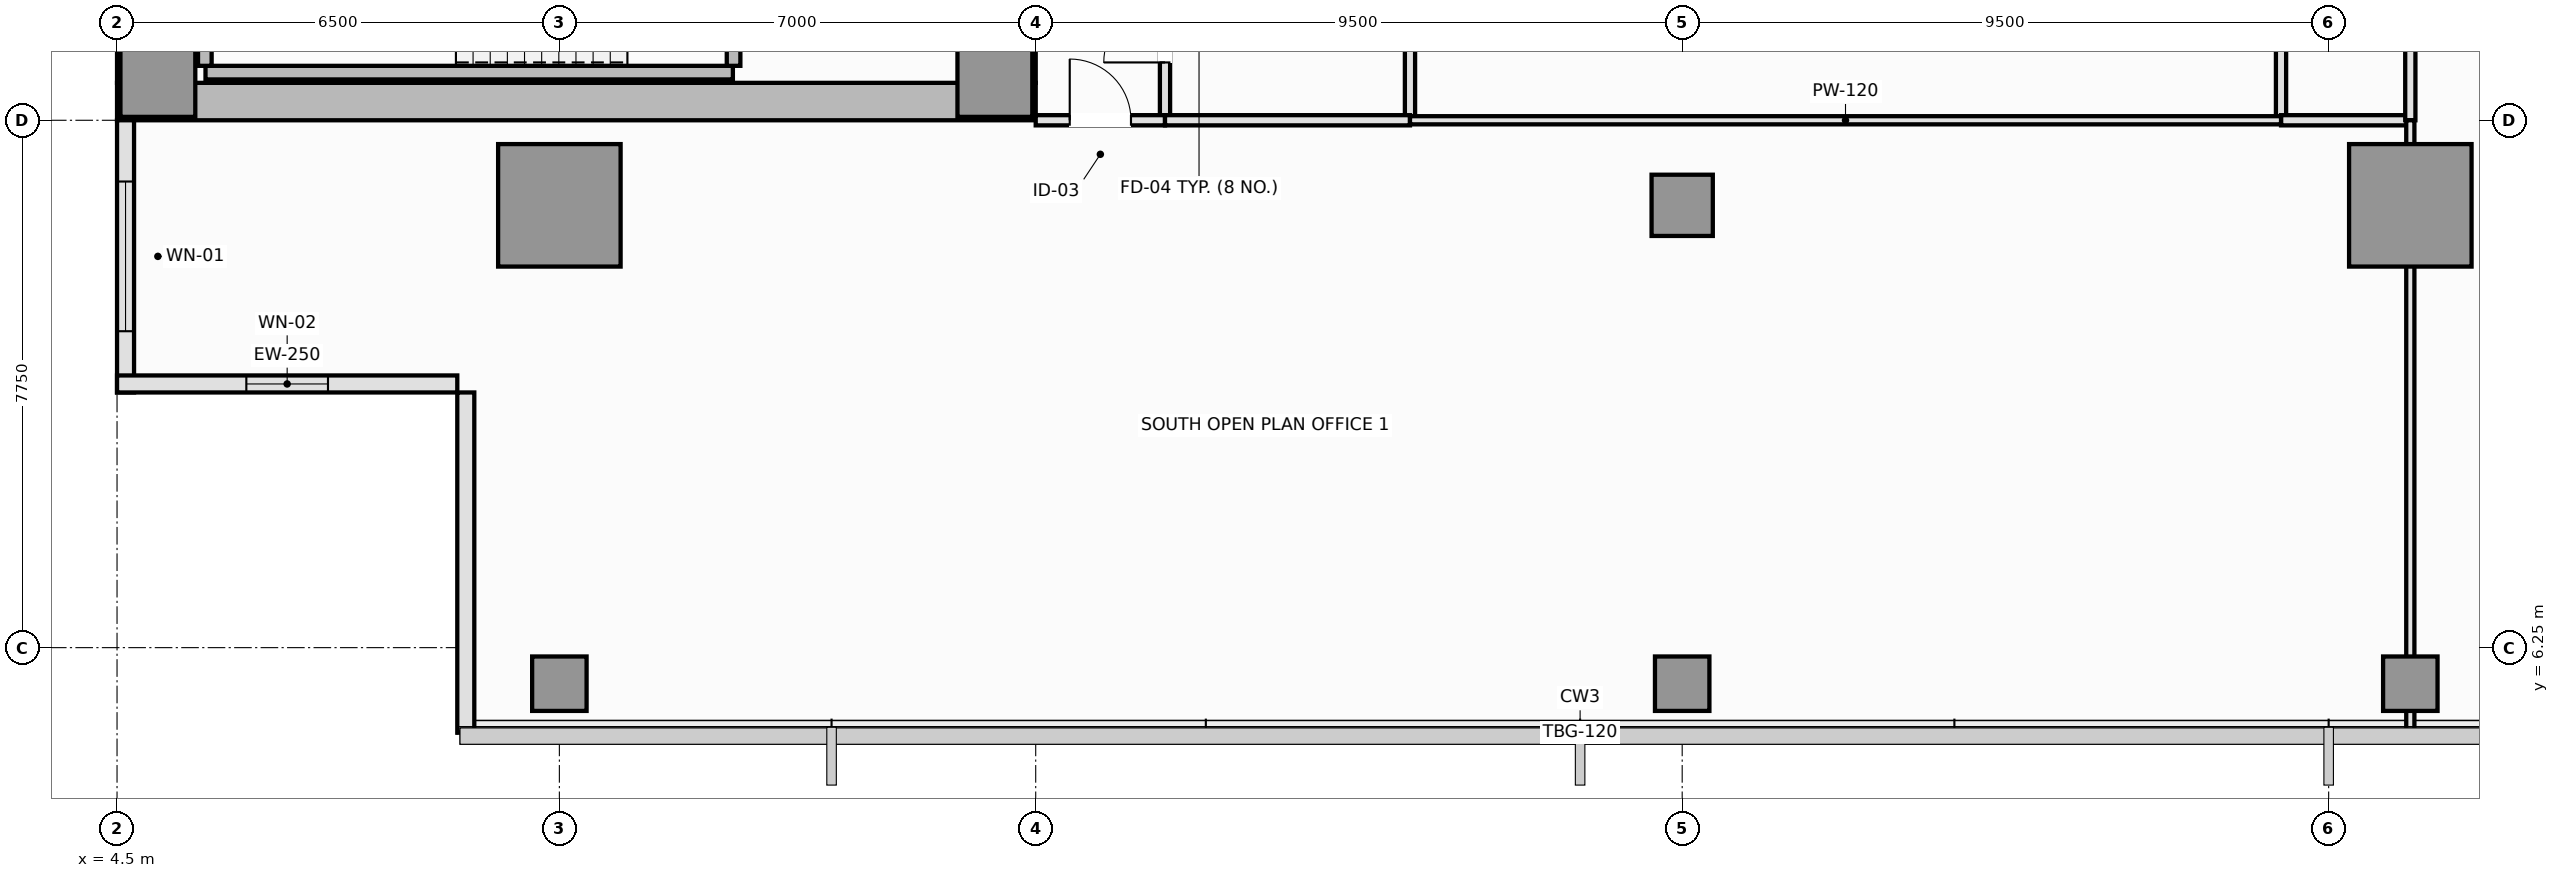
"""IFC4 building model, lengths in metres.
Left out: names, types, materials, properties, quantities, classifications, styles, units other than length and angle.
Written with IfcOpenShell. Run it as: python <this file> out.ifc"""

import sys

from ifc_helpers import new_model, si_unit, direction, frame, frame_2d, origin, origin_2d, place, context, subcontext, project, spatial, rectangle, extrude, element, fill, save


model = new_model("IFC4")
c1 = context("Model", 3, precision=1e-05, world=origin(), true_north=direction((0.0, 1.0)))
c2 = subcontext(c1, "Body", "Model", "MODEL_VIEW")
j1 = project(units=[si_unit("LENGTHUNIT", "METRE"), si_unit("PLANEANGLEUNIT", "RADIAN")], contexts=[c1])
p1 = place(None, origin())
s1 = spatial("IfcSite", under=j1, at=p1, CompositionType="ELEMENT")
p2 = place(p1, origin())
s2 = spatial("IfcBuilding", under=s1, at=p2, CompositionType="ELEMENT")
p3 = place(p2, frame((0.0, 0.0, 202.25)))
s3 = spatial("IfcBuildingStorey", under=s2, at=p3, CompositionType="ELEMENT", Elevation=202.25)
p4 = place(p3, frame((4.5, 14.275, 0.0), z_axis=(0.0, 0.0, 1.0), x_axis=(1.0, 0.0, 0.0)))
e1 = element("IfcWall", 1, at=p4, inside=s3, PredefinedType="SHEAR", context=c2, shape_type="SweptSolid", body=[
    extrude(rectangle(XDim=13.5, YDim=0.55, at=frame_2d((6.75, 0.0))), origin(), (0.0, 0.0, 1.0), 3.55),
])
p5 = place(p3, frame((4.775, 14.55, 0.0), z_axis=(0.0, 0.0, 1.0), x_axis=(0.0, 1.0, 0.0)))
e2 = element("IfcWall", 2, at=p5, inside=s3, PredefinedType="SHEAR", context=c2, shape_type="SweptSolid", body=[
    extrude(rectangle(XDim=21.4, YDim=0.55, at=frame_2d((10.7, 0.0))), origin(), (0.0, 0.0, 1.0), 3.55),
])
p6 = place(p3, frame((17.725, 14.55, 0.0), z_axis=(0.0, 0.0, 1.0), x_axis=(0.0, 1.0, 0.0)))
e3 = element("IfcWall", 3, at=p6, inside=s3, PredefinedType="SHEAR", context=c2, shape_type="SweptSolid", body=[
    extrude(rectangle(XDim=8.9, YDim=0.55, at=frame_2d((4.45, 0.0))), origin(), (0.0, 0.0, 1.0), 3.55),
])
p7 = place(p6, frame((4.35, 0.0, 0.0)))
e4 = element("IfcOpeningElement", 4, at=p7, cuts=e3, PredefinedType="OPENING", context=c2, shape_type="SweptSolid", body=[
    extrude(rectangle(XDim=1.1, YDim=2.15, at=frame_2d((0.55, 1.075))), frame((0.0, 0.285, 0.0), z_axis=(0.0, -1.0, 0.0), x_axis=(1.0, 0.0, 0.0)), (0.0, 0.0, 1.0), 0.57),
])
for number, where, z_axis, x_axis in (
    (5, (5.1, 14.6, 0.0), (0.0, 0.0, 1.0), (1.0, 0.0, 0.0)),
    (6, (17.4, 14.6, 0.0), (0.0, 0.0, 1.0), (1.0, 0.0, 0.0)),
):
    element("IfcColumn", number, at=place(p3, frame(where, z_axis=z_axis, x_axis=x_axis)), inside=s3, PredefinedType="PILASTER", context=c2, shape_type="SweptSolid", body=[
        extrude(rectangle(XDim=1.1, YDim=1.1, at=origin_2d()), origin(), (0.0, 0.0, 1.0), 3.55),
    ])
for number, where, z_axis, x_axis in (
    (7, (11.0, 12.75, 0.0), (0.0, 0.0, 1.0), (1.0, 0.0, 0.0)),
    (8, (38.2, 12.75, 0.0), (0.0, 0.0, 1.0), (1.0, 0.0, 0.0)),
):
    element("IfcColumn", number, at=place(p3, frame(where, z_axis=z_axis, x_axis=x_axis)), inside=s3, PredefinedType="COLUMN", context=c2, shape_type="SweptSolid", body=[
        extrude(rectangle(XDim=1.8, YDim=1.8, at=origin_2d()), origin(), (0.0, 0.0, 1.0), 3.55),
    ])
p8 = place(p3, frame((27.5, 12.75, 0.0), z_axis=(0.0, 0.0, 1.0), x_axis=(1.0, 0.0, 0.0)))
e9 = element("IfcColumn", 9, at=p8, inside=s3, PredefinedType="COLUMN", context=c2, shape_type="SweptSolid", body=[
    extrude(rectangle(XDim=0.9, YDim=0.9, at=origin_2d()), origin(), (0.0, 0.0, 1.0), 3.55),
])
for number, where, z_axis, x_axis in (
    (10, (11.0, 5.72, 0.0), (0.0, 0.0, 1.0), (1.0, 0.0, 0.0)),
    (11, (27.5, 5.72, 0.0), (0.0, 0.0, 1.0), (1.0, 0.0, 0.0)),
    (12, (38.2, 5.72, 0.0), (0.0, 0.0, 1.0), (1.0, 0.0, 0.0)),
):
    element("IfcColumn", number, at=place(p3, frame(where, z_axis=z_axis, x_axis=x_axis)), inside=s3, PredefinedType="COLUMN", context=c2, shape_type="SweptSolid", body=[
        extrude(rectangle(XDim=0.8, YDim=0.8, at=origin_2d()), origin(), (0.0, 0.0, 1.0), 3.55),
    ])
p9 = place(p3, frame((4.625, 14.0, 0.0), z_axis=(0.0, 0.0, 1.0), x_axis=(0.0, -1.0, 0.0)))
e13 = element("IfcWall", 13, at=p9, inside=s3, PredefinedType="SOLIDWALL", context=c2, shape_type="SweptSolid", body=[
    extrude(rectangle(XDim=4.0, YDim=0.25, at=frame_2d((2.0, 0.0))), origin(), (0.0, 0.0, 1.0), 3.37),
])
p10 = place(p9, frame((0.9, 0.0, 0.9)))
e14 = element("IfcOpeningElement", 14, at=p10, cuts=e13, PredefinedType="OPENING", context=c2, shape_type="SweptSolid", body=[
    extrude(rectangle(XDim=2.2, YDim=1.8, at=frame_2d((1.1, 0.9))), frame((0.0, 0.135, 0.0), z_axis=(0.0, -1.0, 0.0), x_axis=(1.0, 0.0, 0.0)), (0.0, 0.0, 1.0), 0.27),
])
p11 = place(p3, frame((4.5, 10.125, 0.0), z_axis=(0.0, 0.0, 1.0), x_axis=(1.0, 0.0, 0.0)))
e15 = element("IfcWall", 15, at=p11, inside=s3, PredefinedType="SOLIDWALL", context=c2, shape_type="SweptSolid", body=[
    extrude(rectangle(XDim=5.0, YDim=0.25, at=frame_2d((2.5, 0.0))), origin(), (0.0, 0.0, 1.0), 3.37),
])
p12 = place(p11, frame((1.9, 0.0, 0.9)))
e16 = element("IfcOpeningElement", 16, at=p12, cuts=e15, PredefinedType="OPENING", context=c2, shape_type="SweptSolid", body=[
    extrude(rectangle(XDim=1.2, YDim=1.8, at=frame_2d((0.6, 0.9))), frame((0.0, 0.135, 0.0), z_axis=(0.0, -1.0, 0.0), x_axis=(1.0, 0.0, 0.0)), (0.0, 0.0, 1.0), 0.27),
])
p13 = place(p3, frame((9.625, 10.0, 0.0), z_axis=(0.0, 0.0, 1.0), x_axis=(0.0, -1.0, 0.0)))
e17 = element("IfcWall", 17, at=p13, inside=s3, PredefinedType="SOLIDWALL", context=c2, shape_type="SweptSolid", body=[
    extrude(rectangle(XDim=5.0, YDim=0.25, at=frame_2d((2.5, 0.0))), origin(), (0.0, 0.0, 1.0), 3.37),
])
p14 = place(p3, frame((5.8, 14.7, 0.0), z_axis=(0.0, 0.0, 1.0), x_axis=(1.0, 0.0, 0.0)))
e18 = element("IfcWall", 18, at=p14, inside=s3, PredefinedType="SOLIDWALL", context=c2, shape_type="SweptSolid", body=[
    extrude(rectangle(XDim=7.75, YDim=0.2, at=frame_2d((3.875, 0.0))), origin(), (0.0, 0.0, 1.0), 3.55),
])
p15 = place(p3, frame((5.79, 14.8, 0.0), z_axis=(0.0, 0.0, 1.0), x_axis=(0.0, 1.0, 0.0)))
e19 = element("IfcWall", 19, at=p15, inside=s3, PredefinedType="SOLIDWALL", context=c2, shape_type="SweptSolid", body=[
    extrude(rectangle(XDim=3.05, YDim=0.2, at=frame_2d((1.525, 0.0))), origin(), (0.0, 0.0, 1.0), 3.55),
])
p16 = place(p3, frame((13.56, 14.8, 0.0), z_axis=(0.0, 0.0, 1.0), x_axis=(0.0, 1.0, 0.0)))
e20 = element("IfcWall", 20, at=p16, inside=s3, PredefinedType="SOLIDWALL", context=c2, shape_type="SweptSolid", body=[
    extrude(rectangle(XDim=3.05, YDim=0.2, at=frame_2d((1.525, 0.0))), origin(), (0.0, 0.0, 1.0), 3.55),
])
p17 = place(p16, frame((0.95, 0.0, 0.0)))
e21 = element("IfcOpeningElement", 21, at=p17, cuts=e20, PredefinedType="OPENING", context=c2, shape_type="SweptSolid", body=[
    extrude(rectangle(XDim=1.15, YDim=2.15, at=frame_2d((0.575, 1.075))), frame((0.0, 0.11, 0.0), z_axis=(0.0, -1.0, 0.0), x_axis=(1.0, 0.0, 0.0)), (0.0, 0.0, 1.0), 0.22),
])
p18 = place(p3, frame((19.9, 14.0, 0.0), z_axis=(0.0, 0.0, 1.0), x_axis=(0.0, 1.0, 0.0)))
e22 = element("IfcWall", 22, at=p18, inside=s3, PredefinedType="PLUMBINGWALL", context=c2, shape_type="SweptSolid", body=[
    extrude(rectangle(XDim=2.6, YDim=0.15, at=frame_2d((1.3, 0.0))), origin(), (0.0, 0.0, 1.0), 3.37),
])
p19 = place(p18, frame((0.85, 0.0, 0.0)))
e23 = element("IfcOpeningElement", 23, at=p19, cuts=e22, PredefinedType="OPENING", context=c2, shape_type="SweptSolid", body=[
    extrude(rectangle(XDim=0.9, YDim=2.1, at=frame_2d((0.45, 1.05))), frame((0.0, 0.085, 0.0), z_axis=(0.0, -1.0, 0.0), x_axis=(1.0, 0.0, 0.0)), (0.0, 0.0, 1.0), 0.17),
])
p20 = place(p3, frame((18.0, 14.0, 0.0), z_axis=(0.0, 0.0, 1.0), x_axis=(1.0, 0.0, 0.0)))
e24 = element("IfcWall", 24, at=p20, inside=s3, PredefinedType="PARTITIONING", context=c2, shape_type="SweptSolid", body=[
    extrude(rectangle(XDim=1.9, YDim=0.15, at=frame_2d((0.95, 0.0))), origin(), (0.0, 0.0, 1.0), 3.37),
])
p21 = place(p20, frame((0.5, 0.0, 0.0)))
e25 = element("IfcOpeningElement", 25, at=p21, cuts=e24, PredefinedType="OPENING", context=c2, shape_type="SweptSolid", body=[
    extrude(rectangle(XDim=0.9, YDim=2.1, at=frame_2d((0.45, 1.05))), frame((0.0, 0.085, 0.0), z_axis=(0.0, -1.0, 0.0), x_axis=(1.0, 0.0, 0.0)), (0.0, 0.0, 1.0), 0.17),
])
p22 = place(p3, frame((36.3, 14.0, 0.0), z_axis=(0.0, 0.0, 1.0), x_axis=(0.0, 1.0, 0.0)))
e26 = element("IfcWall", 26, at=p22, inside=s3, PredefinedType="PARTITIONING", context=c2, shape_type="SweptSolid", body=[
    extrude(rectangle(XDim=4.7, YDim=0.15, at=frame_2d((2.35, 0.0))), origin(), (0.0, 0.0, 1.0), 3.37),
])
p23 = place(p22, frame((1.85, 0.0, 0.0)))
e27 = element("IfcOpeningElement", 27, at=p23, cuts=e26, PredefinedType="OPENING", context=c2, shape_type="SweptSolid", body=[
    extrude(rectangle(XDim=1.0, YDim=2.15, at=frame_2d((0.5, 1.075))), frame((0.0, 0.085, 0.0), z_axis=(0.0, -1.0, 0.0), x_axis=(1.0, 0.0, 0.0)), (0.0, 0.0, 1.0), 0.17),
])
p24 = place(p3, frame((36.3, 14.0, 0.0), z_axis=(0.0, 0.0, 1.0), x_axis=(1.0, 0.0, 0.0)))
e28 = element("IfcWall", 28, at=p24, inside=s3, PredefinedType="PARTITIONING", context=c2, shape_type="SweptSolid", body=[
    extrude(rectangle(XDim=1.9, YDim=0.15, at=frame_2d((0.95, 0.0))), origin(), (0.0, 0.0, 1.0), 3.37),
])
p25 = place(p3, frame((38.2, 14.0, 0.0), z_axis=(0.0, 0.0, 1.0), x_axis=(0.0, 1.0, 0.0)))
e29 = element("IfcWall", 29, at=p25, inside=s3, PredefinedType="PARTITIONING", context=c2, shape_type="SweptSolid", body=[
    extrude(rectangle(XDim=6.8, YDim=0.15, at=frame_2d((3.4, 0.0))), origin(), (0.0, 0.0, 1.0), 2.92),
])
p26 = place(p25, frame((2.679, 0.0, 0.0)))
e30 = element("IfcOpeningElement", 30, at=p26, cuts=e29, PredefinedType="OPENING", context=c2, shape_type="SweptSolid", body=[
    extrude(rectangle(XDim=1.0, YDim=2.15, at=frame_2d((0.5, 1.075))), frame((0.0, 0.085, 0.0), z_axis=(0.0, -1.0, 0.0), x_axis=(1.0, 0.0, 0.0)), (0.0, 0.0, 1.0), 0.17),
])
p27 = place(p3, frame((23.5, 14.0, 0.0), z_axis=(0.0, 0.0, 1.0), x_axis=(0.0, 1.0, 0.0)))
e31 = element("IfcWall", 31, at=p27, inside=s3, PredefinedType="PLUMBINGWALL", context=c2, shape_type="SweptSolid", body=[
    extrude(rectangle(XDim=2.6, YDim=0.15, at=frame_2d((1.3, 0.0))), origin(), (0.0, 0.0, 1.0), 3.37),
])
p28 = place(p3, frame((19.9, 14.0, 0.0), z_axis=(0.0, 0.0, 1.0), x_axis=(1.0, 0.0, 0.0)))
e32 = element("IfcWall", 32, at=p28, inside=s3, PredefinedType="PLUMBINGWALL", context=c2, shape_type="SweptSolid", body=[
    extrude(rectangle(XDim=3.6, YDim=0.15, at=frame_2d((1.8, 0.0))), origin(), (0.0, 0.0, 1.0), 3.37),
])
p29 = place(p3, frame((23.5, 14.0, 0.0), z_axis=(0.0, 0.0, 1.0), x_axis=(1.0, 0.0, 0.0)))
e33 = element("IfcWall", 33, at=p29, inside=s3, PredefinedType="PARTITIONING", context=c2, shape_type="SweptSolid", body=[
    extrude(rectangle(XDim=12.8, YDim=0.12, at=frame_2d((6.4, 0.0))), origin(), (0.0, 0.0, 1.0), 3.37),
])
p30 = place(p3, frame((38.2, 5.01, 0.0), z_axis=(0.0, 0.0, 1.0), x_axis=(0.0, 1.0, 0.0)))
e34 = element("IfcWall", 34, at=p30, inside=s3, PredefinedType="PARTITIONING", context=c2, shape_type="SweptSolid", body=[
    extrude(rectangle(XDim=8.99, YDim=0.12, at=frame_2d((4.495, 0.0))), origin(), (0.0, 0.0, 1.0), 2.92),
])
p31 = place(p10, origin())
e35 = element("IfcWindow", 35, at=p31, inside=s3, PartitioningType="SINGLE_PANEL", PredefinedType="WINDOW", context=c2, shape_type="SweptSolid", body=[
    extrude(rectangle(XDim=2.2, YDim=1.8, at=frame_2d((1.1, 0.9))), frame((0.0, 0.03, 0.0), z_axis=(0.0, -1.0, 0.0), x_axis=(1.0, 0.0, 0.0)), (0.0, 0.0, 1.0), 0.06),
])
fill(e14, e35)
p32 = place(p12, origin())
e36 = element("IfcWindow", 36, at=p32, inside=s3, PartitioningType="SINGLE_PANEL", PredefinedType="WINDOW", context=c2, shape_type="SweptSolid", body=[
    extrude(rectangle(XDim=1.2, YDim=1.8, at=frame_2d((0.6, 0.9))), frame((0.0, 0.03, 0.0), z_axis=(0.0, -1.0, 0.0), x_axis=(1.0, 0.0, 0.0)), (0.0, 0.0, 1.0), 0.06),
])
fill(e16, e36)
p33 = place(p19, origin())
e37 = element("IfcDoor", 37, at=p33, inside=s3, OperationType="SINGLE_SWING_LEFT", PredefinedType="DOOR", context=c2, shape_type="SweptSolid", body=[
    extrude(rectangle(XDim=0.9, YDim=2.1, at=frame_2d((0.45, 1.05))), frame((0.0, 0.025, 0.0), z_axis=(0.0, -1.0, 0.0), x_axis=(1.0, 0.0, 0.0)), (0.0, 0.0, 1.0), 0.05),
])
fill(e23, e37)
p34 = place(p21, origin())
e38 = element("IfcDoor", 38, at=p34, inside=s3, OperationType="SINGLE_SWING_LEFT", PredefinedType="DOOR", context=c2, shape_type="SweptSolid", body=[
    extrude(rectangle(XDim=0.9, YDim=2.1, at=frame_2d((0.45, 1.05))), frame((0.0, 0.025, 0.0), z_axis=(0.0, -1.0, 0.0), x_axis=(1.0, 0.0, 0.0)), (0.0, 0.0, 1.0), 0.05),
])
fill(e25, e38)
save(model, sys.argv[1])
